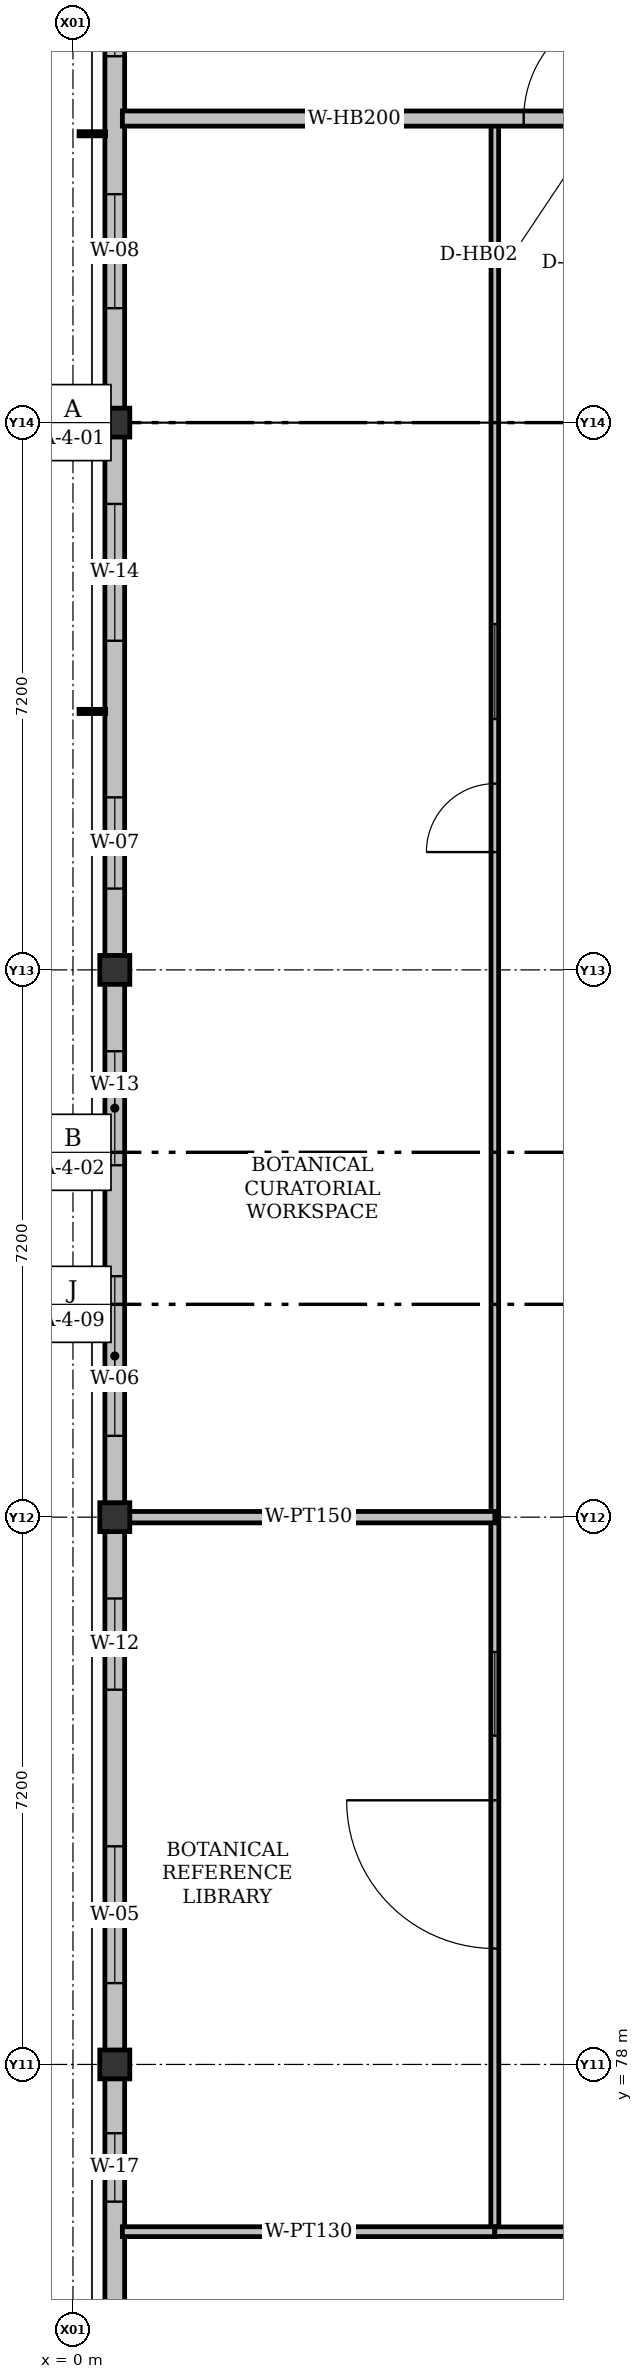
"""IFC4 building model, lengths in metres.
Left out: names, types, materials, properties, quantities, classifications, styles, units other than length and angle.
Written with IfcOpenShell. Run it as: python <this file> out.ifc"""

import sys

from ifc_helpers import new_model, si_unit, direction, frame, frame_2d, origin, origin_2d, place, context, subcontext, project, spatial, rectangle, i_section, extrude, element, fill, save


model = new_model("IFC4")
c1 = context("Model", 3, precision=1e-05, world=origin(), true_north=direction((0.0, 1.0)))
c2 = subcontext(c1, "Body", "Model", "MODEL_VIEW")
j1 = project(units=[si_unit("LENGTHUNIT", "METRE"), si_unit("PLANEANGLEUNIT", "RADIAN")], contexts=[c1])
p1 = place(None, origin())
s1 = spatial("IfcSite", under=j1, at=p1, CompositionType="ELEMENT")
p2 = place(p1, origin())
s2 = spatial("IfcBuilding", under=s1, at=p2, CompositionType="ELEMENT")
p3 = place(p2, frame((0.0, 0.0, 9.9)))
s3 = spatial("IfcBuildingStorey", under=s2, at=p3, CompositionType="ELEMENT", Elevation=9.9)
for number, where, z_axis, x_axis in (
    (1, (0.55, 78.0, 0.0), (0.0, 0.0, 1.0), (1.0, 0.0, 0.0)),
    (2, (0.55, 85.2, 0.0), (0.0, 0.0, 1.0), (1.0, 0.0, 0.0)),
    (3, (0.55, 92.4, 0.0), (0.0, 0.0, 1.0), (1.0, 0.0, 0.0)),
    (4, (0.55, 99.6, 0.0), (0.0, 0.0, 1.0), (1.0, 0.0, 0.0)),
):
    element("IfcColumn", number, at=place(p3, frame(where, z_axis=z_axis, x_axis=x_axis)), inside=s3, PredefinedType="COLUMN", context=c2, shape_type="SweptSolid", body=[
        extrude(i_section(OverallWidth=0.395, OverallDepth=0.38, WebThickness=0.019, FlangeThickness=0.03, FilletRadius=0.015, at=origin_2d()), origin(), (0.0, 0.0, 1.0), 4.2),
    ])
p4 = place(p3, frame((0.55, 70.5, 0.0), z_axis=(0.0, 0.0, 1.0), x_axis=(0.0, 1.0, 0.0)))
e5 = element("IfcWall", 5, at=p4, inside=s3, PredefinedType="SOLIDWALL", context=c2, shape_type="SweptSolid", body=[
    extrude(rectangle(XDim=7.5, YDim=0.26, at=frame_2d((3.75, 0.0))), origin(), (0.0, 0.0, 1.0), 3.592),
])
p5 = place(p4, frame((2.08, 0.0, 0.92)))
e6 = element("IfcOpeningElement", 6, at=p5, cuts=e5, PredefinedType="OPENING", context=c2, shape_type="SweptSolid", body=[
    extrude(rectangle(XDim=1.65, YDim=1.4, at=frame_2d((0.825, 0.7))), frame((0.0, 0.13, 0.0), z_axis=(0.0, -1.0, 0.0), x_axis=(1.0, 0.0, 0.0)), (0.0, 0.0, 1.0), 0.26),
])
p6 = place(p4, frame((5.695, 0.0, 0.92)))
e7 = element("IfcOpeningElement", 7, at=p6, cuts=e5, PredefinedType="OPENING", context=c2, shape_type="SweptSolid", body=[
    extrude(rectangle(XDim=0.9, YDim=1.3, at=frame_2d((0.45, 0.65))), frame((0.0, 0.13, 0.0), z_axis=(0.0, -1.0, 0.0), x_axis=(1.0, 0.0, 0.0)), (0.0, 0.0, 1.0), 0.26),
])
p7 = place(p3, frame((0.55, 78.0, 0.0), z_axis=(0.0, 0.0, 1.0), x_axis=(0.0, 1.0, 0.0)))
e8 = element("IfcWall", 8, at=p7, inside=s3, PredefinedType="SOLIDWALL", context=c2, shape_type="SweptSolid", body=[
    extrude(rectangle(XDim=7.2, YDim=0.26, at=frame_2d((3.6, 0.0))), origin(), (0.0, 0.0, 1.0), 3.592),
])
p8 = place(p7, frame((1.07, 0.0, 0.92)))
e9 = element("IfcOpeningElement", 9, at=p8, cuts=e8, PredefinedType="OPENING", context=c2, shape_type="SweptSolid", body=[
    extrude(rectangle(XDim=1.8, YDim=1.4, at=frame_2d((0.9, 0.7))), frame((0.0, 0.13, 0.0), z_axis=(0.0, -1.0, 0.0), x_axis=(1.0, 0.0, 0.0)), (0.0, 0.0, 1.0), 0.26),
])
p9 = place(p7, frame((4.93, 0.0, 0.92)))
e10 = element("IfcOpeningElement", 10, at=p9, cuts=e8, PredefinedType="OPENING", context=c2, shape_type="SweptSolid", body=[
    extrude(rectangle(XDim=1.2, YDim=1.7, at=frame_2d((0.6, 0.85))), frame((0.0, 0.13, 0.0), z_axis=(0.0, -1.0, 0.0), x_axis=(1.0, 0.0, 0.0)), (0.0, 0.0, 1.0), 0.26),
])
p10 = place(p3, frame((0.55, 85.2, 0.0), z_axis=(0.0, 0.0, 1.0), x_axis=(0.0, 1.0, 0.0)))
e11 = element("IfcWall", 11, at=p10, inside=s3, PredefinedType="SOLIDWALL", context=c2, shape_type="SweptSolid", body=[
    extrude(rectangle(XDim=7.2, YDim=0.26, at=frame_2d((3.6, 0.0))), origin(), (0.0, 0.0, 1.0), 3.592),
])
p11 = place(p10, frame((1.07, 0.0, 0.92)))
e12 = element("IfcOpeningElement", 12, at=p11, cuts=e11, PredefinedType="OPENING", context=c2, shape_type="SweptSolid", body=[
    extrude(rectangle(XDim=2.1, YDim=1.4, at=frame_2d((1.05, 0.7))), frame((0.0, 0.13, 0.0), z_axis=(0.0, -1.0, 0.0), x_axis=(1.0, 0.0, 0.0)), (0.0, 0.0, 1.0), 0.26),
])
p12 = place(p10, frame((4.63, 0.0, 0.92)))
e13 = element("IfcOpeningElement", 13, at=p12, cuts=e11, PredefinedType="OPENING", context=c2, shape_type="SweptSolid", body=[
    extrude(rectangle(XDim=1.5, YDim=1.7, at=frame_2d((0.75, 0.85))), frame((0.0, 0.13, 0.0), z_axis=(0.0, -1.0, 0.0), x_axis=(1.0, 0.0, 0.0)), (0.0, 0.0, 1.0), 0.26),
])
p13 = place(p3, frame((0.55, 92.4, 0.0), z_axis=(0.0, 0.0, 1.0), x_axis=(0.0, 1.0, 0.0)))
e14 = element("IfcWall", 14, at=p13, inside=s3, PredefinedType="SOLIDWALL", context=c2, shape_type="SweptSolid", body=[
    extrude(rectangle(XDim=7.2, YDim=0.26, at=frame_2d((3.6, 0.0))), origin(), (0.0, 0.0, 1.0), 3.592),
])
p14 = place(p13, frame((1.07, 0.0, 0.92)))
e15 = element("IfcOpeningElement", 15, at=p14, cuts=e14, PredefinedType="OPENING", context=c2, shape_type="SweptSolid", body=[
    extrude(rectangle(XDim=1.2, YDim=1.55, at=frame_2d((0.6, 0.775))), frame((0.0, 0.13, 0.0), z_axis=(0.0, -1.0, 0.0), x_axis=(1.0, 0.0, 0.0)), (0.0, 0.0, 1.0), 0.26),
])
p15 = place(p13, frame((4.33, 0.0, 0.92)))
e16 = element("IfcOpeningElement", 16, at=p15, cuts=e14, PredefinedType="OPENING", context=c2, shape_type="SweptSolid", body=[
    extrude(rectangle(XDim=1.8, YDim=1.7, at=frame_2d((0.9, 0.85))), frame((0.0, 0.13, 0.0), z_axis=(0.0, -1.0, 0.0), x_axis=(1.0, 0.0, 0.0)), (0.0, 0.0, 1.0), 0.26),
])
p16 = place(p3, frame((0.55, 99.6, 0.0), z_axis=(0.0, 0.0, 1.0), x_axis=(0.0, 1.0, 0.0)))
e17 = element("IfcWall", 17, at=p16, inside=s3, PredefinedType="SOLIDWALL", context=c2, shape_type="SweptSolid", body=[
    extrude(rectangle(XDim=7.2, YDim=0.26, at=frame_2d((3.6, 0.0))), origin(), (0.0, 0.0, 1.0), 3.592),
])
p17 = place(p16, frame((1.505, 0.0, 0.92)))
e18 = element("IfcOpeningElement", 18, at=p17, cuts=e17, PredefinedType="OPENING", context=c2, shape_type="SweptSolid", body=[
    extrude(rectangle(XDim=1.5, YDim=1.55, at=frame_2d((0.75, 0.775))), frame((0.0, 0.13, 0.0), z_axis=(0.0, -1.0, 0.0), x_axis=(1.0, 0.0, 0.0)), (0.0, 0.0, 1.0), 0.26),
])
p18 = place(p16, frame((4.82, 0.0, 0.92)))
e19 = element("IfcOpeningElement", 19, at=p18, cuts=e17, PredefinedType="OPENING", context=c2, shape_type="SweptSolid", body=[
    extrude(rectangle(XDim=1.05, YDim=1.3, at=frame_2d((0.525, 0.65))), frame((0.0, 0.13, 0.0), z_axis=(0.0, -1.0, 0.0), x_axis=(1.0, 0.0, 0.0)), (0.0, 0.0, 1.0), 0.26),
])
p19 = place(p3, frame((5.55, 75.8, 0.0), z_axis=(0.0, 0.0, 1.0), x_axis=(0.0, 1.0, 0.0)))
e20 = element("IfcWall", 20, at=p19, inside=s3, PredefinedType="PARTITIONING", context=c2, shape_type="SweptSolid", body=[
    extrude(rectangle(XDim=9.4, YDim=0.105, at=frame_2d((4.7, 0.0))), origin(), (0.0, 0.0, 1.0), 3.466),
])
p20 = place(p19, frame((3.725, 0.0, 0.0)))
e21 = element("IfcOpeningElement", 21, at=p20, cuts=e20, PredefinedType="OPENING", context=c2, shape_type="SweptSolid", body=[
    extrude(rectangle(XDim=1.95, YDim=2.4, at=frame_2d((0.975, 1.2))), frame((0.0, 0.052, 0.0), z_axis=(0.0, -1.0, 0.0), x_axis=(1.0, 0.0, 0.0)), (0.0, 0.0, 1.0), 0.105),
])
p21 = place(p19, frame((6.525, 0.0, 0.92)))
e22 = element("IfcOpeningElement", 22, at=p21, cuts=e20, PredefinedType="OPENING", context=c2, shape_type="SweptSolid", body=[
    extrude(rectangle(XDim=1.1, YDim=1.1, at=frame_2d((0.55, 0.55))), frame((0.0, 0.052, 0.0), z_axis=(0.0, -1.0, 0.0), x_axis=(1.0, 0.0, 0.0)), (0.0, 0.0, 1.0), 0.105),
])
p22 = place(p3, frame((5.55, 85.2, 0.0), z_axis=(0.0, 0.0, 1.0), x_axis=(0.0, 1.0, 0.0)))
e23 = element("IfcWall", 23, at=p22, inside=s3, PredefinedType="PARTITIONING", context=c2, shape_type="SweptSolid", body=[
    extrude(rectangle(XDim=18.4, YDim=0.1, at=frame_2d((9.2, 0.0))), origin(), (0.0, 0.0, 1.0), 3.466),
])
p23 = place(p22, frame((8.75, 0.0, 0.0)))
e24 = element("IfcOpeningElement", 24, at=p23, cuts=e23, PredefinedType="OPENING", context=c2, shape_type="SweptSolid", body=[
    extrude(rectangle(XDim=0.9, YDim=2.08, at=frame_2d((0.45, 1.04))), frame((0.0, 0.05, 0.0), z_axis=(0.0, -1.0, 0.0), x_axis=(1.0, 0.0, 0.0)), (0.0, 0.0, 1.0), 0.1),
])
p24 = place(p22, frame((10.5, 0.0, 0.92)))
e25 = element("IfcOpeningElement", 25, at=p24, cuts=e23, PredefinedType="OPENING", context=c2, shape_type="SweptSolid", body=[
    extrude(rectangle(XDim=1.25, YDim=1.1, at=frame_2d((0.625, 0.55))), frame((0.0, 0.05, 0.0), z_axis=(0.0, -1.0, 0.0), x_axis=(1.0, 0.0, 0.0)), (0.0, 0.0, 1.0), 0.1),
])
p25 = place(p3, frame((0.65, 85.2, 0.0), z_axis=(0.0, 0.0, 1.0), x_axis=(1.0, 0.0, 0.0)))
e26 = element("IfcWall", 26, at=p25, inside=s3, PredefinedType="PARTITIONING", context=c2, shape_type="SweptSolid", body=[
    extrude(rectangle(XDim=4.9, YDim=0.15, at=frame_2d((2.45, 0.0))), origin(), (0.0, 0.0, 1.0), 3.466),
])
p26 = place(p3, frame((0.65, 103.6, 0.0), z_axis=(0.0, 0.0, 1.0), x_axis=(1.0, 0.0, 0.0)))
e27 = element("IfcWall", 27, at=p26, inside=s3, PredefinedType="SOLIDWALL", context=c2, shape_type="SweptSolid", body=[
    extrude(rectangle(XDim=7.2, YDim=0.2, at=frame_2d((3.6, 0.0))), origin(), (0.0, 0.0, 1.0), 3.542),
])
p27 = place(p26, frame((5.28, 0.0, 0.0)))
e28 = element("IfcOpeningElement", 28, at=p27, cuts=e27, PredefinedType="OPENING", context=c2, shape_type="SweptSolid", body=[
    extrude(rectangle(XDim=1.5, YDim=2.3, at=frame_2d((0.75, 1.15))), frame((0.0, 0.1, 0.0), z_axis=(0.0, -1.0, 0.0), x_axis=(1.0, 0.0, 0.0)), (0.0, 0.0, 1.0), 0.2),
])
p28 = place(p3, frame((0.65, 75.8, 0.0), z_axis=(0.0, 0.0, 1.0), x_axis=(1.0, 0.0, 0.0)))
e29 = element("IfcWall", 29, at=p28, inside=s3, PredefinedType="PARTITIONING", context=c2, shape_type="SweptSolid", body=[
    extrude(rectangle(XDim=4.9, YDim=0.13, at=frame_2d((2.45, 0.0))), origin(), (0.0, 0.0, 1.0), 3.95),
])
p29 = place(p3, frame((19.75, 75.8, 0.0), z_axis=(0.0, 0.0, 1.0), x_axis=(-1.0, 0.0, 0.0)))
e30 = element("IfcWall", 30, at=p29, inside=s3, PredefinedType="PARTITIONING", context=c2, shape_type="SweptSolid", body=[
    extrude(rectangle(XDim=14.2, YDim=0.125, at=frame_2d((7.1, 0.0))), origin(), (0.0, 0.0, 1.0), 3.542),
])
p30 = place(p29, frame((8.04, 0.0, 0.0)))
e31 = element("IfcOpeningElement", 31, at=p30, cuts=e30, PredefinedType="OPENING", context=c2, shape_type="SweptSolid", body=[
    extrude(rectangle(XDim=1.32, YDim=2.18, at=frame_2d((0.66, 1.09))), frame((0.0, 0.062, 0.0), z_axis=(0.0, -1.0, 0.0), x_axis=(1.0, 0.0, 0.0)), (0.0, 0.0, 1.0), 0.125),
])
p31 = place(p29, frame((10.21, 0.0, 0.92)))
e32 = element("IfcOpeningElement", 32, at=p31, cuts=e30, PredefinedType="OPENING", context=c2, shape_type="SweptSolid", body=[
    extrude(rectangle(XDim=0.9, YDim=1.2, at=frame_2d((0.45, 0.6))), frame((0.0, 0.062, 0.0), z_axis=(0.0, -1.0, 0.0), x_axis=(1.0, 0.0, 0.0)), (0.0, 0.0, 1.0), 0.125),
])
p32 = place(p6, origin())
e33 = element("IfcWindow", 33, at=p32, inside=s3, PartitioningType="SINGLE_PANEL", PredefinedType="WINDOW", context=c2, shape_type="SweptSolid", body=[
    extrude(rectangle(XDim=0.9, YDim=1.3, at=frame_2d((0.45, 0.65))), frame((0.0, 0.03, 0.0), z_axis=(0.0, -1.0, 0.0), x_axis=(1.0, 0.0, 0.0)), (0.0, 0.0, 1.0), 0.06),
])
fill(e7, e33)
p33 = place(p8, origin())
e34 = element("IfcWindow", 34, at=p33, inside=s3, PartitioningType="DOUBLE_PANEL_VERTICAL", PredefinedType="WINDOW", context=c2, shape_type="SweptSolid", body=[
    extrude(rectangle(XDim=1.8, YDim=1.4, at=frame_2d((0.9, 0.7))), frame((0.0, 0.03, 0.0), z_axis=(0.0, -1.0, 0.0), x_axis=(1.0, 0.0, 0.0)), (0.0, 0.0, 1.0), 0.06),
])
fill(e9, e34)
p34 = place(p9, origin())
e35 = element("IfcWindow", 35, at=p34, inside=s3, PartitioningType="SINGLE_PANEL", PredefinedType="WINDOW", context=c2, shape_type="SweptSolid", body=[
    extrude(rectangle(XDim=1.2, YDim=1.7, at=frame_2d((0.6, 0.85))), frame((0.0, 0.03, 0.0), z_axis=(0.0, -1.0, 0.0), x_axis=(1.0, 0.0, 0.0)), (0.0, 0.0, 1.0), 0.06),
])
fill(e10, e35)
p35 = place(p11, origin())
e36 = element("IfcWindow", 36, at=p35, inside=s3, PartitioningType="DOUBLE_PANEL_VERTICAL", PredefinedType="WINDOW", context=c2, shape_type="SweptSolid", body=[
    extrude(rectangle(XDim=2.1, YDim=1.4, at=frame_2d((1.05, 0.7))), frame((0.0, 0.03, 0.0), z_axis=(0.0, -1.0, 0.0), x_axis=(1.0, 0.0, 0.0)), (0.0, 0.0, 1.0), 0.06),
])
fill(e12, e36)
p36 = place(p12, origin())
e37 = element("IfcWindow", 37, at=p36, inside=s3, PartitioningType="SINGLE_PANEL", PredefinedType="WINDOW", context=c2, shape_type="SweptSolid", body=[
    extrude(rectangle(XDim=1.5, YDim=1.7, at=frame_2d((0.75, 0.85))), frame((0.0, 0.03, 0.0), z_axis=(0.0, -1.0, 0.0), x_axis=(1.0, 0.0, 0.0)), (0.0, 0.0, 1.0), 0.06),
])
fill(e13, e37)
p37 = place(p14, origin())
e38 = element("IfcWindow", 38, at=p37, inside=s3, PartitioningType="SINGLE_PANEL", PredefinedType="WINDOW", context=c2, shape_type="SweptSolid", body=[
    extrude(rectangle(XDim=1.2, YDim=1.55, at=frame_2d((0.6, 0.775))), frame((0.0, 0.03, 0.0), z_axis=(0.0, -1.0, 0.0), x_axis=(1.0, 0.0, 0.0)), (0.0, 0.0, 1.0), 0.06),
])
fill(e15, e38)
p38 = place(p15, origin())
e39 = element("IfcWindow", 39, at=p38, inside=s3, PartitioningType="DOUBLE_PANEL_VERTICAL", PredefinedType="WINDOW", context=c2, shape_type="SweptSolid", body=[
    extrude(rectangle(XDim=1.8, YDim=1.7, at=frame_2d((0.9, 0.85))), frame((0.0, 0.03, 0.0), z_axis=(0.0, -1.0, 0.0), x_axis=(1.0, 0.0, 0.0)), (0.0, 0.0, 1.0), 0.06),
])
fill(e16, e39)
p39 = place(p17, origin())
e40 = element("IfcWindow", 40, at=p39, inside=s3, PartitioningType="SINGLE_PANEL", PredefinedType="WINDOW", context=c2, shape_type="SweptSolid", body=[
    extrude(rectangle(XDim=1.5, YDim=1.55, at=frame_2d((0.75, 0.775))), frame((0.0, 0.03, 0.0), z_axis=(0.0, -1.0, 0.0), x_axis=(1.0, 0.0, 0.0)), (0.0, 0.0, 1.0), 0.06),
])
fill(e18, e40)
p40 = place(p18, origin())
e41 = element("IfcWindow", 41, at=p40, inside=s3, PartitioningType="SINGLE_PANEL", PredefinedType="WINDOW", context=c2, shape_type="SweptSolid", body=[
    extrude(rectangle(XDim=1.05, YDim=1.3, at=frame_2d((0.525, 0.65))), frame((0.0, 0.03, 0.0), z_axis=(0.0, -1.0, 0.0), x_axis=(1.0, 0.0, 0.0)), (0.0, 0.0, 1.0), 0.06),
])
fill(e19, e41)
p41 = place(p20, origin())
e42 = element("IfcDoor", 42, at=p41, inside=s3, OperationType="SINGLE_SWING_RIGHT", PredefinedType="DOOR", context=c2, shape_type="SweptSolid", body=[
    extrude(rectangle(XDim=1.95, YDim=2.4, at=frame_2d((0.975, 1.2))), frame((0.0, 0.025, 0.0), z_axis=(0.0, -1.0, 0.0), x_axis=(1.0, 0.0, 0.0)), (0.0, 0.0, 1.0), 0.05),
])
fill(e21, e42)
p42 = place(p21, origin())
e43 = element("IfcWindow", 43, at=p42, inside=s3, PartitioningType="SINGLE_PANEL", PredefinedType="WINDOW", context=c2, shape_type="SweptSolid", body=[
    extrude(rectangle(XDim=1.1, YDim=1.1, at=frame_2d((0.55, 0.55))), frame((0.0, 0.03, 0.0), z_axis=(0.0, -1.0, 0.0), x_axis=(1.0, 0.0, 0.0)), (0.0, 0.0, 1.0), 0.06),
])
fill(e22, e43)
p43 = place(p23, origin())
e44 = element("IfcDoor", 44, at=p43, inside=s3, OperationType="SINGLE_SWING_LEFT", PredefinedType="DOOR", context=c2, shape_type="SweptSolid", body=[
    extrude(rectangle(XDim=0.9, YDim=2.08, at=frame_2d((0.45, 1.04))), frame((0.0, 0.025, 0.0), z_axis=(0.0, -1.0, 0.0), x_axis=(1.0, 0.0, 0.0)), (0.0, 0.0, 1.0), 0.05),
])
fill(e24, e44)
p44 = place(p24, origin())
e45 = element("IfcWindow", 45, at=p44, inside=s3, PartitioningType="SINGLE_PANEL", PredefinedType="WINDOW", context=c2, shape_type="SweptSolid", body=[
    extrude(rectangle(XDim=1.25, YDim=1.1, at=frame_2d((0.625, 0.55))), frame((0.0, 0.03, 0.0), z_axis=(0.0, -1.0, 0.0), x_axis=(1.0, 0.0, 0.0)), (0.0, 0.0, 1.0), 0.06),
])
fill(e25, e45)
p45 = place(p27, origin())
e46 = element("IfcDoor", 46, at=p45, inside=s3, OperationType="SINGLE_SWING_RIGHT", PredefinedType="DOOR", context=c2, shape_type="SweptSolid", body=[
    extrude(rectangle(XDim=1.5, YDim=2.3, at=frame_2d((0.75, 1.15))), frame((0.0, 0.025, 0.0), z_axis=(0.0, -1.0, 0.0), x_axis=(1.0, 0.0, 0.0)), (0.0, 0.0, 1.0), 0.05),
])
fill(e28, e46)
save(model, sys.argv[1])
